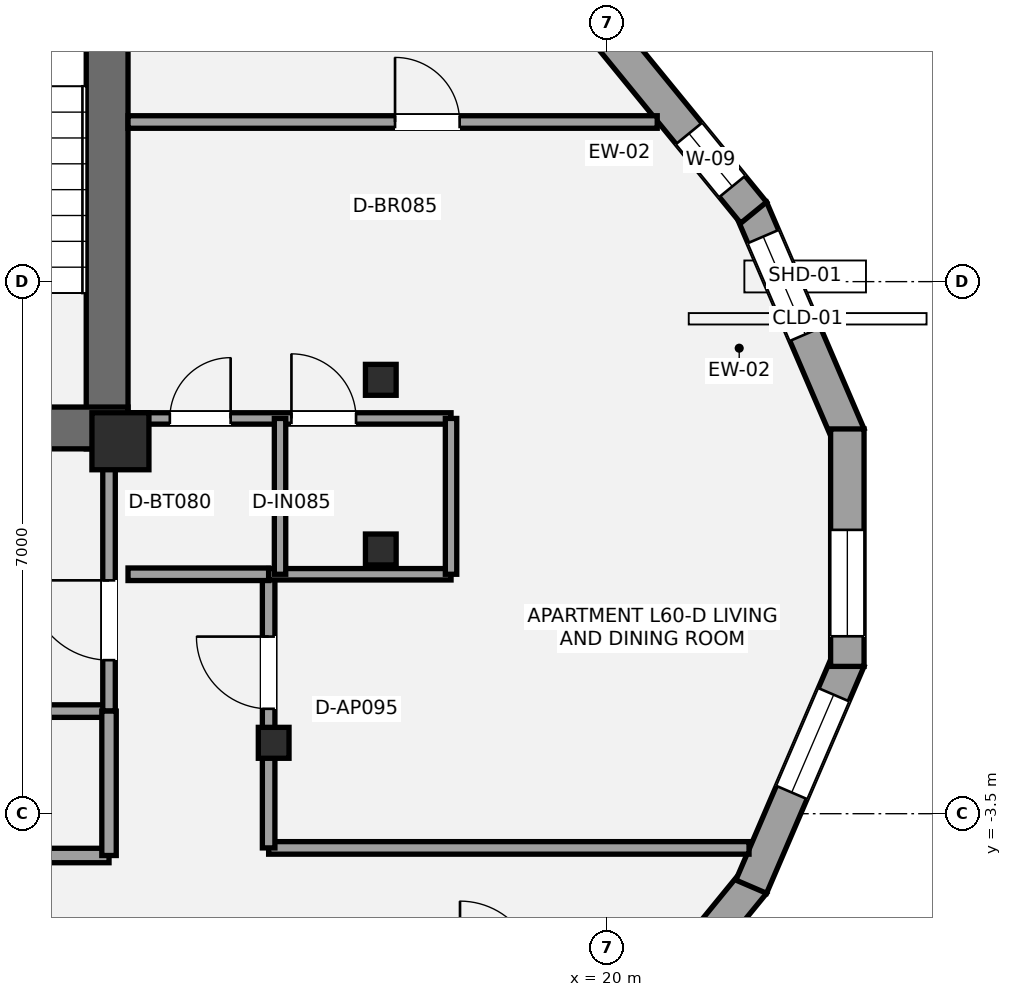
"""IFC4 building model, lengths in metres.
Left out: names, types, materials, properties, quantities, classifications, styles, units other than length and angle.
Written with IfcOpenShell. Run it as: python <this file> out.ifc"""

import sys

from ifc_helpers import new_model, si_unit, direction, frame, frame_2d, origin, origin_2d, place, context, subcontext, project, spatial, rectangle, i_section, extrude, element, fill, save


model = new_model("IFC4")
c1 = context("Model", 3, precision=1e-05, world=origin(), true_north=direction((0.0, 1.0)))
c2 = subcontext(c1, "Body", "Model", "MODEL_VIEW")
j1 = project(units=[si_unit("LENGTHUNIT", "METRE"), si_unit("PLANEANGLEUNIT", "RADIAN")], contexts=[c1])
p1 = place(None, origin())
s1 = spatial("IfcSite", under=j1, at=p1, CompositionType="ELEMENT")
p2 = place(p1, origin())
s2 = spatial("IfcBuilding", under=s1, at=p2, CompositionType="ELEMENT")
p3 = place(p2, frame((0.0, 0.0, 216.3)))
s3 = spatial("IfcBuildingStorey", under=s2, at=p3, CompositionType="ELEMENT", Elevation=216.3)
p4 = place(p3, frame((13.425, 1.3, 0.0), z_axis=(0.0, 0.0, 1.0), x_axis=(0.0, 1.0, 0.0)))
e1 = element("IfcWall", 1, at=p4, inside=s3, PredefinedType="SHEAR", context=c2, shape_type="SweptSolid", body=[
    extrude(rectangle(XDim=8.25, YDim=0.55, at=frame_2d((4.125, 0.0))), origin(), (0.0, 0.0, 1.0), 3.15),
])
p5 = place(p3, frame((13.7, 1.575, 0.0), z_axis=(0.0, 0.0, 1.0), x_axis=(-1.0, 0.0, 0.0)))
e2 = element("IfcWall", 2, at=p5, inside=s3, PredefinedType="SHEAR", context=c2, shape_type="SweptSolid", body=[
    extrude(rectangle(XDim=8.775, YDim=0.55, at=frame_2d((4.387, 0.0))), origin(), (0.0, 0.0, 1.0), 3.15),
])
p6 = place(p5, frame((2.35, 0.0, 0.0)))
e3 = element("IfcOpeningElement", 3, at=p6, cuts=e2, PredefinedType="OPENING", context=c2, shape_type="SweptSolid", body=[
    extrude(rectangle(XDim=1.05, YDim=2.15, at=frame_2d((0.525, 1.075))), frame((0.0, 0.285, 0.0), z_axis=(0.0, -1.0, 0.0), x_axis=(1.0, 0.0, 0.0)), (0.0, 0.0, 1.0), 0.57),
])
p7 = place(p5, frame((4.35, 0.0, 0.0)))
e4 = element("IfcOpeningElement", 4, at=p7, cuts=e2, PredefinedType="OPENING", context=c2, shape_type="SweptSolid", body=[
    extrude(rectangle(XDim=1.1, YDim=2.2, at=frame_2d((0.55, 1.1))), frame((0.0, 0.285, 0.0), z_axis=(0.0, -1.0, 0.0), x_axis=(1.0, 0.0, 0.0)), (0.0, 0.0, 1.0), 0.57),
])
p8 = place(p3, frame((13.6, 1.4, 0.0), z_axis=(0.0, 0.0, 1.0), x_axis=(1.0, 0.0, 0.0)))
e5 = element("IfcColumn", 5, at=p8, inside=s3, PredefinedType="PILASTER", context=c2, shape_type="SweptSolid", body=[
    extrude(rectangle(XDim=0.75, YDim=0.75, at=origin_2d()), origin(), (0.0, 0.0, 1.0), 3.15),
])
for number, where, z_axis, x_axis in (
    (6, (17.026, 2.208, 0.0), (0.0, 0.0, 1.0), (1.0, 0.0, 0.0)),
    (7, (15.616, -2.567, 0.0), (0.0, 0.0, 1.0), (1.0, 0.0, 0.0)),
    (8, (17.026, -0.024, 0.0), (0.0, 0.0, 1.0), (1.0, 0.0, 0.0)),
):
    element("IfcColumn", number, at=place(p3, frame(where, z_axis=z_axis, x_axis=x_axis)), inside=s3, PredefinedType="COLUMN", context=c2, shape_type="SweptSolid", body=[
        extrude(i_section(OverallWidth=0.404, OverallDepth=0.407, WebThickness=0.027, FlangeThickness=0.044, at=origin_2d()), origin(), (0.0, 0.0, 1.0), 3.15),
    ])
p9 = place(p3, frame((21.899, 4.46, 0.0), z_axis=(0.0, 0.0, 1.0), x_axis=(0.394735370712, -0.918794855835, 0.0)))
e9 = element("IfcWall", 9, at=p9, inside=s3, PredefinedType="STANDARD", context=c2, shape_type="SweptSolid", body=[
    extrude(rectangle(XDim=3.249, YDim=0.44, at=frame_2d((1.625, 0.0))), origin(), (0.0, 0.0, 1.0), 2.336),
])
p10 = place(p9, frame((0.4, 0.0, 0.55)))
e10 = element("IfcOpeningElement", 10, at=p10, cuts=e9, PredefinedType="OPENING", context=c2, shape_type="SweptSolid", body=[
    extrude(rectangle(XDim=1.4, YDim=1.55, at=frame_2d((0.7, 0.775))), frame((0.0, 0.23, 0.0), z_axis=(0.0, -1.0, 0.0), x_axis=(1.0, 0.0, 0.0)), (0.0, 0.0, 1.0), 0.46),
])
p11 = place(p3, frame((19.747, 7.081, 0.0), z_axis=(0.0, 0.0, 1.0), x_axis=(0.632725461905, -0.774376194015, 0.0)))
e11 = element("IfcWall", 11, at=p11, inside=s3, PredefinedType="STANDARD", context=c2, shape_type="SweptSolid", body=[
    extrude(rectangle(XDim=3.452, YDim=0.44, at=frame_2d((1.726, 0.0))), origin(), (0.0, 0.0, 1.0), 2.336),
])
p12 = place(p11, frame((2.108, 0.0, 0.58)))
e12 = element("IfcOpeningElement", 12, at=p12, cuts=e11, PredefinedType="OPENING", context=c2, shape_type="SweptSolid", body=[
    extrude(rectangle(XDim=0.9, YDim=1.35, at=frame_2d((0.45, 0.675))), frame((0.0, 0.23, 0.0), z_axis=(0.0, -1.0, 0.0), x_axis=(1.0, 0.0, 0.0)), (0.0, 0.0, 1.0), 0.46),
])
p13 = place(p3, frame((21.931, -4.408, 0.0), z_axis=(0.0, 0.0, 1.0), x_axis=(-0.632725461905, -0.774376194015, 0.0)))
e13 = element("IfcWall", 13, at=p13, inside=s3, PredefinedType="STANDARD", context=c2, shape_type="SweptSolid", body=[
    extrude(rectangle(XDim=3.452, YDim=0.44, at=frame_2d((1.726, 0.0))), origin(), (0.0, 0.0, 1.0), 2.336),
])
p14 = place(p13, frame((1.852, 0.0, 0.58)))
e14 = element("IfcOpeningElement", 14, at=p14, cuts=e13, PredefinedType="OPENING", context=c2, shape_type="SweptSolid", body=[
    extrude(rectangle(XDim=1.4, YDim=1.55, at=frame_2d((0.7, 0.775))), frame((0.0, 0.23, 0.0), z_axis=(0.0, -1.0, 0.0), x_axis=(1.0, 0.0, 0.0)), (0.0, 0.0, 1.0), 0.46),
])
p15 = place(p3, frame((23.182, -1.475, 0.0), z_axis=(0.0, 0.0, 1.0), x_axis=(-0.394735370712, -0.918794855835, 0.0)))
e15 = element("IfcWall", 15, at=p15, inside=s3, PredefinedType="STANDARD", context=c2, shape_type="SweptSolid", body=[
    extrude(rectangle(XDim=3.249, YDim=0.44, at=frame_2d((1.625, 0.0))), origin(), (0.0, 0.0, 1.0), 2.336),
])
p16 = place(p15, frame((0.5, 0.0, 0.55)))
e16 = element("IfcOpeningElement", 16, at=p16, cuts=e15, PredefinedType="OPENING", context=c2, shape_type="SweptSolid", body=[
    extrude(rectangle(XDim=1.4, YDim=1.55, at=frame_2d((0.7, 0.775))), frame((0.0, 0.23, 0.0), z_axis=(0.0, -1.0, 0.0), x_axis=(1.0, 0.0, 0.0)), (0.0, 0.0, 1.0), 0.46),
])
p17 = place(p3, frame((23.164, 1.562, 0.0), z_axis=(0.0, 0.0, 1.0), x_axis=(0.0, -1.0, 0.0)))
e17 = element("IfcWall", 17, at=p17, inside=s3, PredefinedType="STANDARD", context=c2, shape_type="SweptSolid", body=[
    extrude(rectangle(XDim=3.124, YDim=0.44, at=frame_2d((1.562, 0.0))), origin(), (0.0, 0.0, 1.0), 2.336),
])
p18 = place(p17, frame((1.328, 0.0, 0.58)))
e18 = element("IfcOpeningElement", 18, at=p18, cuts=e17, PredefinedType="OPENING", context=c2, shape_type="SweptSolid", body=[
    extrude(rectangle(XDim=1.4, YDim=1.55, at=frame_2d((0.7, 0.775))), frame((0.0, 0.23, 0.0), z_axis=(0.0, -1.0, 0.0), x_axis=(1.0, 0.0, 0.0)), (0.0, 0.0, 1.0), 0.46),
])
p19 = place(p3, frame((7.2, -2.15, 0.0), z_axis=(0.0, 0.0, 1.0), x_axis=(1.0, 0.0, 0.0)))
e19 = element("IfcWall", 19, at=p19, inside=s3, PredefinedType="PARTITIONING", context=c2, shape_type="SweptSolid", body=[
    extrude(rectangle(XDim=6.25, YDim=0.165, at=frame_2d((3.125, 0.0))), origin(), (0.0, 0.0, 1.0), 2.97),
])
p20 = place(p3, frame((13.45, -2.15, 0.0), z_axis=(0.0, 0.0, 1.0), x_axis=(0.0, 1.0, 0.0)))
e20 = element("IfcWall", 20, at=p20, inside=s3, PredefinedType="PARTITIONING", context=c2, shape_type="SweptSolid", body=[
    extrude(rectangle(XDim=3.5, YDim=0.165, at=frame_2d((1.75, 0.0))), origin(), (0.0, 0.0, 1.0), 2.423),
])
p21 = place(p20, frame((0.67, 0.0, 0.0)))
e21 = element("IfcOpeningElement", 21, at=p21, cuts=e20, PredefinedType="OPENING", context=c2, shape_type="SweptSolid", body=[
    extrude(rectangle(XDim=1.05, YDim=2.15, at=frame_2d((0.525, 1.075))), frame((0.0, 0.093, 0.0), z_axis=(0.0, -1.0, 0.0), x_axis=(1.0, 0.0, 0.0)), (0.0, 0.0, 1.0), 0.185),
])
p22 = place(p3, frame((2.1, -4.05, 0.0), z_axis=(0.0, 0.0, 1.0), x_axis=(1.0, 0.0, 0.0)))
e22 = element("IfcWall", 22, at=p22, inside=s3, PredefinedType="PLUMBINGWALL", context=c2, shape_type="SweptSolid", body=[
    extrude(rectangle(XDim=11.35, YDim=0.19, at=frame_2d((5.675, 0.0))), origin(), (0.0, 0.0, 1.0), 2.357),
])
p23 = place(p22, frame((1.4, 0.0, 0.0)))
e23 = element("IfcOpeningElement", 23, at=p23, cuts=e22, PredefinedType="OPENING", context=c2, shape_type="SweptSolid", body=[
    extrude(rectangle(XDim=0.9, YDim=2.1, at=frame_2d((0.45, 1.05))), frame((0.0, 0.105, 0.0), z_axis=(0.0, -1.0, 0.0), x_axis=(1.0, 0.0, 0.0)), (0.0, 0.0, 1.0), 0.21),
])
p24 = place(p22, frame((5.3, 0.0, 0.0)))
e24 = element("IfcOpeningElement", 24, at=p24, cuts=e22, PredefinedType="OPENING", context=c2, shape_type="SweptSolid", body=[
    extrude(rectangle(XDim=0.9, YDim=2.1, at=frame_2d((0.45, 1.05))), frame((0.0, 0.105, 0.0), z_axis=(0.0, -1.0, 0.0), x_axis=(1.0, 0.0, 0.0)), (0.0, 0.0, 1.0), 0.21),
])
p25 = place(p22, frame((9.1, 0.0, 0.0)))
e25 = element("IfcOpeningElement", 25, at=p25, cuts=e22, PredefinedType="OPENING", context=c2, shape_type="SweptSolid", body=[
    extrude(rectangle(XDim=0.9, YDim=2.1, at=frame_2d((0.45, 1.05))), frame((0.0, 0.105, 0.0), z_axis=(0.0, -1.0, 0.0), x_axis=(1.0, 0.0, 0.0)), (0.0, 0.0, 1.0), 0.21),
])
p26 = place(p3, frame((13.45, -4.05, 0.0), z_axis=(0.0, 0.0, 1.0), x_axis=(0.0, 1.0, 0.0)))
e26 = element("IfcWall", 26, at=p26, inside=s3, PredefinedType="PLUMBINGWALL", context=c2, shape_type="SweptSolid", body=[
    extrude(rectangle(XDim=1.9, YDim=0.19, at=frame_2d((0.95, 0.0))), origin(), (0.0, 0.0, 1.0), 2.423),
])
p27 = place(p3, frame((15.55, -3.95, 0.0), z_axis=(0.0, 0.0, 1.0), x_axis=(1.0, 0.0, 0.0)))
e27 = element("IfcWall", 27, at=p27, inside=s3, PredefinedType="PARTITIONING", context=c2, shape_type="SweptSolid", body=[
    extrude(rectangle(XDim=6.321, YDim=0.165, at=frame_2d((3.16, 0.0))), origin(), (0.0, 0.0, 1.0), 2.423),
])
p28 = place(p3, frame((15.55, -3.95, 0.0), z_axis=(0.0, 0.0, 1.0), x_axis=(0.0, 1.0, 0.0)))
e28 = element("IfcWall", 28, at=p28, inside=s3, PredefinedType="PARTITIONING", context=c2, shape_type="SweptSolid", body=[
    extrude(rectangle(XDim=3.6, YDim=0.165, at=frame_2d((1.8, 0.0))), origin(), (0.0, 0.0, 1.0), 2.357),
])
p29 = place(p28, frame((1.83, 0.0, 0.0)))
e29 = element("IfcOpeningElement", 29, at=p29, cuts=e28, PredefinedType="OPENING", context=c2, shape_type="SweptSolid", body=[
    extrude(rectangle(XDim=0.95, YDim=2.15, at=frame_2d((0.475, 1.075))), frame((0.0, 0.093, 0.0), z_axis=(0.0, -1.0, 0.0), x_axis=(1.0, 0.0, 0.0)), (0.0, 0.0, 1.0), 0.185),
])
p30 = place(p3, frame((13.7, -0.35, 0.0), z_axis=(0.0, 0.0, 1.0), x_axis=(1.0, 0.0, 0.0)))
e30 = element("IfcWall", 30, at=p30, inside=s3, PredefinedType="PARTITIONING", context=c2, shape_type="SweptSolid", body=[
    extrude(rectangle(XDim=1.85, YDim=0.165, at=frame_2d((0.925, 0.0))), origin(), (0.0, 0.0, 1.0), 2.423),
])
p31 = place(p3, frame((13.7, 5.6, 0.0), z_axis=(0.0, 0.0, 1.0), x_axis=(1.0, 0.0, 0.0)))
e31 = element("IfcWall", 31, at=p31, inside=s3, PredefinedType="PARTITIONING", context=c2, shape_type="SweptSolid", body=[
    extrude(rectangle(XDim=6.963, YDim=0.165, at=frame_2d((3.481, 0.0))), origin(), (0.0, 0.0, 1.0), 2.97),
])
p32 = place(p31, frame((3.513, 0.0, 0.0)))
e32 = element("IfcOpeningElement", 32, at=p32, cuts=e31, PredefinedType="OPENING", context=c2, shape_type="SweptSolid", body=[
    extrude(rectangle(XDim=0.85, YDim=2.1, at=frame_2d((0.425, 1.05))), frame((0.0, 0.093, 0.0), z_axis=(0.0, -1.0, 0.0), x_axis=(1.0, 0.0, 0.0)), (0.0, 0.0, 1.0), 0.185),
])
p33 = place(p3, frame((13.7, 1.7, 0.0), z_axis=(0.0, 0.0, 1.0), x_axis=(1.0, 0.0, 0.0)))
e33 = element("IfcWall", 33, at=p33, inside=s3, PredefinedType="PLUMBINGWALL", context=c2, shape_type="SweptSolid", body=[
    extrude(rectangle(XDim=4.25, YDim=0.15, at=frame_2d((2.125, 0.0))), origin(), (0.0, 0.0, 1.0), 2.423),
])
p34 = place(p33, frame((0.55, 0.0, 0.0)))
e34 = element("IfcOpeningElement", 34, at=p34, cuts=e33, PredefinedType="OPENING", context=c2, shape_type="SweptSolid", body=[
    extrude(rectangle(XDim=0.8, YDim=2.1, at=frame_2d((0.4, 1.05))), frame((0.0, 0.085, 0.0), z_axis=(0.0, -1.0, 0.0), x_axis=(1.0, 0.0, 0.0)), (0.0, 0.0, 1.0), 0.17),
])
p35 = place(p33, frame((2.15, 0.0, 0.0)))
e35 = element("IfcOpeningElement", 35, at=p35, cuts=e33, PredefinedType="OPENING", context=c2, shape_type="SweptSolid", body=[
    extrude(rectangle(XDim=0.85, YDim=2.1, at=frame_2d((0.425, 1.05))), frame((0.0, 0.085, 0.0), z_axis=(0.0, -1.0, 0.0), x_axis=(1.0, 0.0, 0.0)), (0.0, 0.0, 1.0), 0.17),
])
p36 = place(p3, frame((15.55, -0.35, 0.0), z_axis=(0.0, 0.0, 1.0), x_axis=(1.0, 0.0, 0.0)))
e36 = element("IfcWall", 36, at=p36, inside=s3, PredefinedType="PLUMBINGWALL", context=c2, shape_type="SweptSolid", body=[
    extrude(rectangle(XDim=2.4, YDim=0.15, at=frame_2d((1.2, 0.0))), origin(), (0.0, 0.0, 1.0), 2.423),
])
p37 = place(p3, frame((15.7, -0.35, 0.0), z_axis=(0.0, 0.0, 1.0), x_axis=(0.0, 1.0, 0.0)))
e37 = element("IfcWall", 37, at=p37, inside=s3, PredefinedType="PLUMBINGWALL", context=c2, shape_type="SweptSolid", body=[
    extrude(rectangle(XDim=2.05, YDim=0.15, at=frame_2d((1.025, 0.0))), origin(), (0.0, 0.0, 1.0), 2.97),
])
p38 = place(p3, frame((17.95, -0.35, 0.0), z_axis=(0.0, 0.0, 1.0), x_axis=(0.0, 1.0, 0.0)))
e38 = element("IfcWall", 38, at=p38, inside=s3, PredefinedType="PLUMBINGWALL", context=c2, shape_type="SweptSolid", body=[
    extrude(rectangle(XDim=2.05, YDim=0.15, at=frame_2d((1.025, 0.0))), origin(), (0.0, 0.0, 1.0), 2.423),
])
p39 = place(p10, origin())
e39 = element("IfcWindow", 39, at=p39, inside=s3, PartitioningType="SINGLE_PANEL", PredefinedType="WINDOW", context=c2, shape_type="SweptSolid", body=[
    extrude(rectangle(XDim=1.4, YDim=1.55, at=frame_2d((0.7, 0.775))), frame((0.0, -0.01, 0.0), z_axis=(0.0, -1.0, 0.0), x_axis=(1.0, 0.0, 0.0)), (0.0, 0.0, 1.0), 0.06),
])
fill(e10, e39)
p40 = place(p12, origin())
e40 = element("IfcWindow", 40, at=p40, inside=s3, PartitioningType="SINGLE_PANEL", PredefinedType="WINDOW", context=c2, shape_type="SweptSolid", body=[
    extrude(rectangle(XDim=0.9, YDim=1.35, at=frame_2d((0.45, 0.675))), frame((0.0, -0.01, 0.0), z_axis=(0.0, -1.0, 0.0), x_axis=(1.0, 0.0, 0.0)), (0.0, 0.0, 1.0), 0.06),
])
fill(e12, e40)
p41 = place(p16, origin())
e41 = element("IfcWindow", 41, at=p41, inside=s3, PartitioningType="SINGLE_PANEL", PredefinedType="WINDOW", context=c2, shape_type="SweptSolid", body=[
    extrude(rectangle(XDim=1.4, YDim=1.55, at=frame_2d((0.7, 0.775))), frame((0.0, -0.01, 0.0), z_axis=(0.0, -1.0, 0.0), x_axis=(1.0, 0.0, 0.0)), (0.0, 0.0, 1.0), 0.06),
])
fill(e16, e41)
p42 = place(p18, origin())
e42 = element("IfcWindow", 42, at=p42, inside=s3, PartitioningType="SINGLE_PANEL", PredefinedType="WINDOW", context=c2, shape_type="SweptSolid", body=[
    extrude(rectangle(XDim=1.4, YDim=1.55, at=frame_2d((0.7, 0.775))), frame((0.0, -0.01, 0.0), z_axis=(0.0, -1.0, 0.0), x_axis=(1.0, 0.0, 0.0)), (0.0, 0.0, 1.0), 0.06),
])
fill(e18, e42)
p43 = place(p21, origin())
e43 = element("IfcDoor", 43, at=p43, inside=s3, OperationType="SINGLE_SWING_RIGHT", PredefinedType="DOOR", context=c2, shape_type="SweptSolid", body=[
    extrude(rectangle(XDim=1.05, YDim=2.15, at=frame_2d((0.525, 1.075))), frame((0.0, 0.025, 0.0), z_axis=(0.0, -1.0, 0.0), x_axis=(1.0, 0.0, 0.0)), (0.0, 0.0, 1.0), 0.05),
])
fill(e21, e43)
p44 = place(p29, origin())
e44 = element("IfcDoor", 44, at=p44, inside=s3, OperationType="SINGLE_SWING_RIGHT", PredefinedType="DOOR", context=c2, shape_type="SweptSolid", body=[
    extrude(rectangle(XDim=0.95, YDim=2.15, at=frame_2d((0.475, 1.075))), frame((0.0, 0.025, 0.0), z_axis=(0.0, -1.0, 0.0), x_axis=(1.0, 0.0, 0.0)), (0.0, 0.0, 1.0), 0.05),
])
fill(e29, e44)
p45 = place(p34, origin())
e45 = element("IfcDoor", 45, at=p45, inside=s3, OperationType="SINGLE_SWING_RIGHT", PredefinedType="DOOR", context=c2, shape_type="SweptSolid", body=[
    extrude(rectangle(XDim=0.8, YDim=2.1, at=frame_2d((0.4, 1.05))), frame((0.0, 0.025, 0.0), z_axis=(0.0, -1.0, 0.0), x_axis=(1.0, 0.0, 0.0)), (0.0, 0.0, 1.0), 0.05),
])
fill(e34, e45)
p46 = place(p35, origin())
e46 = element("IfcDoor", 46, at=p46, inside=s3, OperationType="SINGLE_SWING_LEFT", PredefinedType="DOOR", context=c2, shape_type="SweptSolid", body=[
    extrude(rectangle(XDim=0.85, YDim=2.1, at=frame_2d((0.425, 1.05))), frame((0.0, 0.025, 0.0), z_axis=(0.0, -1.0, 0.0), x_axis=(1.0, 0.0, 0.0)), (0.0, 0.0, 1.0), 0.05),
])
fill(e35, e46)
p47 = place(p32, origin())
e47 = element("IfcDoor", 47, at=p47, inside=s3, OperationType="SINGLE_SWING_LEFT", PredefinedType="DOOR", context=c2, shape_type="SweptSolid", body=[
    extrude(rectangle(XDim=0.85, YDim=2.1, at=frame_2d((0.425, 1.05))), frame((0.0, 0.025, 0.0), z_axis=(0.0, -1.0, 0.0), x_axis=(1.0, 0.0, 0.0)), (0.0, 0.0, 1.0), 0.05),
])
fill(e32, e47)
save(model, sys.argv[1])
